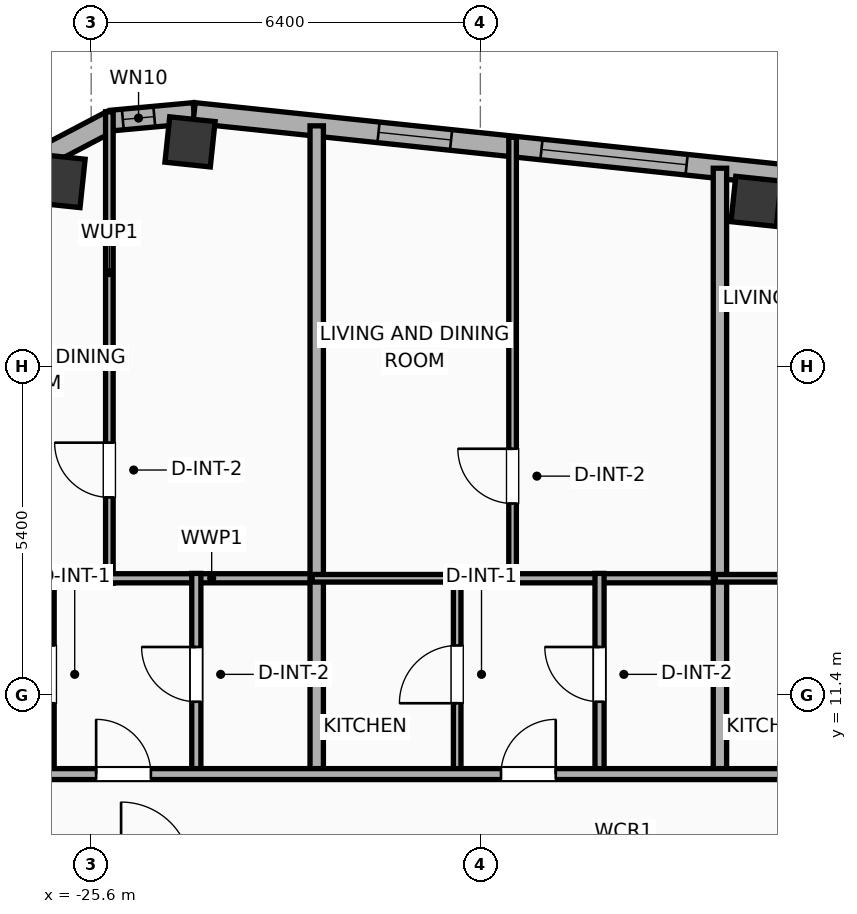
"""IFC4 building model, lengths in metres.
Left out: names, types, materials, properties, quantities, classifications, styles, units other than length and angle.
Written with IfcOpenShell. Run it as: python <this file> out.ifc"""

import sys

from ifc_helpers import new_model, si_unit, direction, frame, frame_2d, origin, origin_2d, place, context, subcontext, project, spatial, rectangle, hollow_rectangle, hollow_circle, extrude, element, fill, save


model = new_model("IFC4")
c1 = context("Model", 3, precision=1e-05, world=origin(), true_north=direction((0.0, 1.0)))
c2 = subcontext(c1, "Body", "Model", "MODEL_VIEW")
j1 = project(units=[si_unit("LENGTHUNIT", "METRE"), si_unit("PLANEANGLEUNIT", "RADIAN")], contexts=[c1])
p1 = place(None, origin())
s1 = spatial("IfcSite", under=j1, at=p1, CompositionType="ELEMENT")
p2 = place(p1, origin())
s2 = spatial("IfcBuilding", under=s1, at=p2, CompositionType="ELEMENT")
p3 = place(p2, frame((0.0, 0.0, 271.7)))
s3 = spatial("IfcBuildingStorey", under=s2, at=p3, CompositionType="ELEMENT", Elevation=271.7)
for number, where, z_axis, x_axis in (
    (1, (-14.666, 19.518, 0.0), (0.0, 0.0, 1.0), (0.995, -0.105, 0.0)),
    (2, (-23.975, 20.497, 0.0), (0.0, 0.0, 1.0), (0.995, -0.105, 0.0)),
):
    element("IfcColumn", number, at=place(p3, frame(where, z_axis=z_axis, x_axis=x_axis)), inside=s3, PredefinedType="COLUMN", context=c2, shape_type="SweptSolid", body=[
        extrude(hollow_rectangle(XDim=0.75, YDim=0.75, WallThickness=0.025, at=origin_2d()), origin(), (0.0, 0.0, 1.0), 3.9),
    ])
p4 = place(p3, frame((-26.139, 19.855, 0.0), z_axis=(0.0, 0.0, 1.0), x_axis=(0.994521895368, -0.104528463268, 0.0)))
e3 = element("IfcColumn", 3, at=p4, inside=s3, PredefinedType="COLUMN", context=c2, shape_type="SweptSolid", body=[
    extrude(hollow_circle(Radius=0.4, WallThickness=0.028, at=origin_2d()), origin(), (0.0, 0.0, 1.0), 3.9),
])
p5 = place(p3, frame((-26.439, 20.226, 0.0), z_axis=(0.0, 0.0, 1.0), x_axis=(0.884922182678, 0.465738908193, 0.0)))
e4 = element("IfcWall", 4, at=p5, inside=s3, PredefinedType="ELEMENTEDWALL", context=c2, shape_type="SweptSolid", body=[
    extrude(rectangle(XDim=1.337, YDim=0.34, at=frame_2d((0.668, 0.0))), origin(), (0.0, 0.0, 1.0), 3.65),
])
p6 = place(p3, frame((-25.256, 20.848, 0.0), z_axis=(0.0, 0.0, 1.0), x_axis=(0.995813013343, 0.091413579172, 0.0)))
e5 = element("IfcWall", 5, at=p6, inside=s3, PredefinedType="ELEMENTEDWALL", context=c2, shape_type="SweptSolid", body=[
    extrude(rectangle(XDim=1.354, YDim=0.34, at=frame_2d((0.677, 0.0))), origin(), (0.0, 0.0, 1.0), 3.65),
])
p7 = place(p6, frame((0.177, 0.0, 0.75)))
e6 = element("IfcOpeningElement", 6, at=p7, cuts=e5, PredefinedType="OPENING", context=c2, shape_type="SweptSolid", body=[
    extrude(rectangle(XDim=0.52, YDim=2.05, at=frame_2d((0.26, 1.025))), frame((0.0, 0.18, 0.0), z_axis=(0.0, -1.0, 0.0), x_axis=(1.0, 0.0, 0.0)), (0.0, 0.0, 1.0), 0.36),
])
p8 = place(p3, frame((-23.908, 20.972, 0.0), z_axis=(0.0, 0.0, 1.0), x_axis=(0.994521888554, -0.104528528102, 0.0)))
e7 = element("IfcWall", 7, at=p8, inside=s3, PredefinedType="ELEMENTEDWALL", context=c2, shape_type="SweptSolid", body=[
    extrude(rectangle(XDim=46.766, YDim=0.34, at=frame_2d((23.383, 0.0))), origin(), (0.0, 0.0, 1.0), 3.65),
])
p9 = place(p8, frame((5.744, 0.0, 0.75)))
e8 = element("IfcOpeningElement", 8, at=p9, cuts=e7, PredefinedType="OPENING", context=c2, shape_type="SweptSolid", body=[
    extrude(rectangle(XDim=2.4, YDim=2.1, at=frame_2d((1.2, 1.05))), frame((0.0, 0.18, 0.0), z_axis=(0.0, -1.0, 0.0), x_axis=(1.0, 0.0, 0.0)), (0.0, 0.0, 1.0), 0.36),
])
p10 = place(p8, frame((3.05, 0.0, 0.75)))
e9 = element("IfcOpeningElement", 9, at=p10, cuts=e7, PredefinedType="OPENING", context=c2, shape_type="SweptSolid", body=[
    extrude(rectangle(XDim=1.2, YDim=2.05, at=frame_2d((0.6, 1.025))), frame((0.0, 0.18, 0.0), z_axis=(0.0, -1.0, 0.0), x_axis=(1.0, 0.0, 0.0)), (0.0, 0.0, 1.0), 0.36),
])
p11 = place(p8, frame((9.957, 0.0, 0.75)))
e10 = element("IfcOpeningElement", 10, at=p11, cuts=e7, PredefinedType="OPENING", context=c2, shape_type="SweptSolid", body=[
    extrude(rectangle(XDim=1.2, YDim=2.05, at=frame_2d((0.6, 1.025))), frame((0.0, 0.18, 0.0), z_axis=(0.0, -1.0, 0.0), x_axis=(1.0, 0.0, 0.0)), (0.0, 0.0, 1.0), 0.36),
])
p12 = place(p8, frame((13.05, 0.0, 0.75)))
e11 = element("IfcOpeningElement", 11, at=p12, cuts=e7, PredefinedType="OPENING", context=c2, shape_type="SweptSolid", body=[
    extrude(rectangle(XDim=1.2, YDim=2.05, at=frame_2d((0.6, 1.025))), frame((0.0, 0.18, 0.0), z_axis=(0.0, -1.0, 0.0), x_axis=(1.0, 0.0, 0.0)), (0.0, 0.0, 1.0), 0.36),
])
p13 = place(p8, frame((16.383, 0.0, 0.75)))
e12 = element("IfcOpeningElement", 12, at=p13, cuts=e7, PredefinedType="OPENING", context=c2, shape_type="SweptSolid", body=[
    extrude(rectangle(XDim=1.2, YDim=2.05, at=frame_2d((0.6, 1.025))), frame((0.0, 0.18, 0.0), z_axis=(0.0, -1.0, 0.0), x_axis=(1.0, 0.0, 0.0)), (0.0, 0.0, 1.0), 0.36),
])
p14 = place(p8, frame((19.716, 0.0, 0.75)))
e13 = element("IfcOpeningElement", 13, at=p14, cuts=e7, PredefinedType="OPENING", context=c2, shape_type="SweptSolid", body=[
    extrude(rectangle(XDim=1.2, YDim=2.05, at=frame_2d((0.6, 1.025))), frame((0.0, 0.18, 0.0), z_axis=(0.0, -1.0, 0.0), x_axis=(1.0, 0.0, 0.0)), (0.0, 0.0, 1.0), 0.36),
])
p15 = place(p8, frame((23.195, 0.0, 0.75)))
e14 = element("IfcOpeningElement", 14, at=p15, cuts=e7, PredefinedType="OPENING", context=c2, shape_type="SweptSolid", body=[
    extrude(rectangle(XDim=1.2, YDim=2.05, at=frame_2d((0.6, 1.025))), frame((0.0, 0.18, 0.0), z_axis=(0.0, -1.0, 0.0), x_axis=(1.0, 0.0, 0.0)), (0.0, 0.0, 1.0), 0.36),
])
p16 = place(p8, frame((26.194, 0.0, 0.75)))
e15 = element("IfcOpeningElement", 15, at=p16, cuts=e7, PredefinedType="OPENING", context=c2, shape_type="SweptSolid", body=[
    extrude(rectangle(XDim=1.2, YDim=2.05, at=frame_2d((0.6, 1.025))), frame((0.0, 0.18, 0.0), z_axis=(0.0, -1.0, 0.0), x_axis=(1.0, 0.0, 0.0)), (0.0, 0.0, 1.0), 0.36),
])
p17 = place(p8, frame((30.152, 0.0, 0.75)))
e16 = element("IfcOpeningElement", 16, at=p17, cuts=e7, PredefinedType="OPENING", context=c2, shape_type="SweptSolid", body=[
    extrude(rectangle(XDim=1.2, YDim=2.05, at=frame_2d((0.6, 1.025))), frame((0.0, 0.18, 0.0), z_axis=(0.0, -1.0, 0.0), x_axis=(1.0, 0.0, 0.0)), (0.0, 0.0, 1.0), 0.36),
])
p18 = place(p8, frame((33.631, 0.0, 0.75)))
e17 = element("IfcOpeningElement", 17, at=p18, cuts=e7, PredefinedType="OPENING", context=c2, shape_type="SweptSolid", body=[
    extrude(rectangle(XDim=1.2, YDim=2.05, at=frame_2d((0.6, 1.025))), frame((0.0, 0.18, 0.0), z_axis=(0.0, -1.0, 0.0), x_axis=(1.0, 0.0, 0.0)), (0.0, 0.0, 1.0), 0.36),
])
p19 = place(p8, frame((38.07, 0.0, 0.75)))
e18 = element("IfcOpeningElement", 18, at=p19, cuts=e7, PredefinedType="OPENING", context=c2, shape_type="SweptSolid", body=[
    extrude(rectangle(XDim=1.2, YDim=2.05, at=frame_2d((0.6, 1.025))), frame((0.0, 0.18, 0.0), z_axis=(0.0, -1.0, 0.0), x_axis=(1.0, 0.0, 0.0)), (0.0, 0.0, 1.0), 0.36),
])
p20 = place(p8, frame((40.589, 0.0, 0.75)))
e19 = element("IfcOpeningElement", 19, at=p20, cuts=e7, PredefinedType="OPENING", context=c2, shape_type="SweptSolid", body=[
    extrude(rectangle(XDim=1.2, YDim=2.05, at=frame_2d((0.6, 1.025))), frame((0.0, 0.18, 0.0), z_axis=(0.0, -1.0, 0.0), x_axis=(1.0, 0.0, 0.0)), (0.0, 0.0, 1.0), 0.36),
])
p21 = place(p8, frame((43.789, 0.0, 0.75)))
e20 = element("IfcOpeningElement", 20, at=p21, cuts=e7, PredefinedType="OPENING", context=c2, shape_type="SweptSolid", body=[
    extrude(rectangle(XDim=1.2, YDim=2.05, at=frame_2d((0.6, 1.025))), frame((0.0, 0.18, 0.0), z_axis=(0.0, -1.0, 0.0), x_axis=(1.0, 0.0, 0.0)), (0.0, 0.0, 1.0), 0.36),
])
p22 = place(p3, frame((-25.301, 13.24, 0.0), z_axis=(0.0, 0.0, 1.0), x_axis=(0.0, 1.0, 0.0)))
e21 = element("IfcWall", 21, at=p22, inside=s3, PredefinedType="PARTITIONING", context=c2, shape_type="SweptSolid", body=[
    extrude(rectangle(XDim=7.751, YDim=0.125, at=frame_2d((3.875, 0.0))), origin(), (0.0, 0.0, 1.0), 3.65),
])
p23 = place(p22, frame((1.41, 0.0, 0.0)))
e22 = element("IfcOpeningElement", 22, at=p23, cuts=e21, PredefinedType="OPENING", context=c2, shape_type="SweptSolid", body=[
    extrude(rectangle(XDim=0.9, YDim=2.05, at=frame_2d((0.45, 1.025))), frame((0.0, 0.073, 0.0), z_axis=(0.0, -1.0, 0.0), x_axis=(1.0, 0.0, 0.0)), (0.0, 0.0, 1.0), 0.145),
])
p24 = place(p3, frame((-25.421, 13.32, 0.0), z_axis=(0.0, 0.0, 1.0), x_axis=(1.0, 0.0, 0.0)))
e23 = element("IfcWall", 23, at=p24, inside=s3, PredefinedType="PLUMBINGWALL", context=c2, shape_type="SweptSolid", body=[
    extrude(rectangle(XDim=3.605, YDim=0.15, at=frame_2d((1.802, 0.0))), origin(), (0.0, 0.0, 1.0), 3.65),
])
p25 = place(p3, frame((-26.271, 10.08, 0.0), z_axis=(0.0, 0.0, 1.0), x_axis=(0.0, 1.0, 0.0)))
e24 = element("IfcWall", 24, at=p25, inside=s3, PredefinedType="PARTITIONING", context=c2, shape_type="SweptSolid", body=[
    extrude(rectangle(XDim=3.32, YDim=0.125, at=frame_2d((1.66, 0.0))), origin(), (0.0, 0.0, 1.0), 3.65),
])
p26 = place(p25, frame((1.185, 0.0, 0.0)))
e25 = element("IfcOpeningElement", 25, at=p26, cuts=e24, PredefinedType="OPENING", context=c2, shape_type="SweptSolid", body=[
    extrude(rectangle(XDim=0.95, YDim=2.05, at=frame_2d((0.475, 1.025))), frame((0.0, 0.073, 0.0), z_axis=(0.0, -1.0, 0.0), x_axis=(1.0, 0.0, 0.0)), (0.0, 0.0, 1.0), 0.145),
])
p27 = place(p3, frame((-28.329, 13.32, 0.0), z_axis=(0.0, 0.0, 1.0), x_axis=(1.0, 0.0, 0.0)))
e26 = element("IfcWall", 26, at=p27, inside=s3, PredefinedType="PARTITIONING", context=c2, shape_type="SweptSolid", body=[
    extrude(rectangle(XDim=2.178, YDim=0.125, at=frame_2d((1.089, 0.0))), origin(), (0.0, 0.0, 1.0), 3.65),
])
p28 = place(p3, frame((-23.871, 10.08, 0.0), z_axis=(0.0, 0.0, 1.0), x_axis=(0.0, 1.0, 0.0)))
e27 = element("IfcWall", 27, at=p28, inside=s3, PredefinedType="PLUMBINGWALL", context=c2, shape_type="SweptSolid", body=[
    extrude(rectangle(XDim=3.32, YDim=0.15, at=frame_2d((1.66, 0.0))), origin(), (0.0, 0.0, 1.0), 3.65),
])
p29 = place(p28, frame((1.21, 0.0, 0.0)))
e28 = element("IfcOpeningElement", 28, at=p29, cuts=e27, PredefinedType="OPENING", context=c2, shape_type="SweptSolid", body=[
    extrude(rectangle(XDim=0.9, YDim=2.05, at=frame_2d((0.45, 1.025))), frame((0.0, 0.085, 0.0), z_axis=(0.0, -1.0, 0.0), x_axis=(1.0, 0.0, 0.0)), (0.0, 0.0, 1.0), 0.17),
])
p30 = place(p3, frame((-21.891, 10.02, 0.0), z_axis=(0.0, 0.0, 1.0), x_axis=(0.0, 1.0, 0.0)))
e29 = element("IfcWall", 29, at=p30, inside=s3, PredefinedType="PARTITIONING", context=c2, shape_type="SweptSolid", body=[
    extrude(rectangle(XDim=10.74, YDim=0.22, at=frame_2d((5.37, 0.0))), origin(), (0.0, 0.0, 1.0), 3.09),
])
p31 = place(p3, frame((-18.67, 13.24, 0.0), z_axis=(0.0, 0.0, 1.0), x_axis=(0.0, 1.0, 0.0)))
e30 = element("IfcWall", 30, at=p31, inside=s3, PredefinedType="PARTITIONING", context=c2, shape_type="SweptSolid", body=[
    extrude(rectangle(XDim=7.333, YDim=0.125, at=frame_2d((3.666, 0.0))), origin(), (0.0, 0.0, 1.0), 3.65),
])
p32 = place(p31, frame((1.31, 0.0, 0.0)))
e31 = element("IfcOpeningElement", 31, at=p32, cuts=e30, PredefinedType="OPENING", context=c2, shape_type="SweptSolid", body=[
    extrude(rectangle(XDim=0.9, YDim=2.05, at=frame_2d((0.45, 1.025))), frame((0.0, 0.073, 0.0), z_axis=(0.0, -1.0, 0.0), x_axis=(1.0, 0.0, 0.0)), (0.0, 0.0, 1.0), 0.145),
])
p33 = place(p3, frame((-18.79, 13.32, 0.0), z_axis=(0.0, 0.0, 1.0), x_axis=(1.0, 0.0, 0.0)))
e32 = element("IfcWall", 32, at=p33, inside=s3, PredefinedType="PLUMBINGWALL", context=c2, shape_type="SweptSolid", body=[
    extrude(rectangle(XDim=3.605, YDim=0.15, at=frame_2d((1.802, 0.0))), origin(), (0.0, 0.0, 1.0), 3.65),
])
p34 = place(p3, frame((-19.581, 10.08, 0.0), z_axis=(0.0, 0.0, 1.0), x_axis=(0.0, 1.0, 0.0)))
e33 = element("IfcWall", 33, at=p34, inside=s3, PredefinedType="PARTITIONING", context=c2, shape_type="SweptSolid", body=[
    extrude(rectangle(XDim=3.32, YDim=0.125, at=frame_2d((1.66, 0.0))), origin(), (0.0, 0.0, 1.0), 3.65),
])
p35 = place(p34, frame((1.185, 0.0, 0.0)))
e34 = element("IfcOpeningElement", 34, at=p35, cuts=e33, PredefinedType="OPENING", context=c2, shape_type="SweptSolid", body=[
    extrude(rectangle(XDim=0.95, YDim=2.05, at=frame_2d((0.475, 1.025))), frame((0.0, 0.073, 0.0), z_axis=(0.0, -1.0, 0.0), x_axis=(1.0, 0.0, 0.0)), (0.0, 0.0, 1.0), 0.145),
])
p36 = place(p3, frame((-21.966, 13.32, 0.0), z_axis=(0.0, 0.0, 1.0), x_axis=(1.0, 0.0, 0.0)))
e35 = element("IfcWall", 35, at=p36, inside=s3, PredefinedType="PARTITIONING", context=c2, shape_type="SweptSolid", body=[
    extrude(rectangle(XDim=2.505, YDim=0.125, at=frame_2d((1.252, 0.0))), origin(), (0.0, 0.0, 1.0), 3.65),
])
p37 = place(p3, frame((-17.24, 10.08, 0.0), z_axis=(0.0, 0.0, 1.0), x_axis=(0.0, 1.0, 0.0)))
e36 = element("IfcWall", 36, at=p37, inside=s3, PredefinedType="PLUMBINGWALL", context=c2, shape_type="SweptSolid", body=[
    extrude(rectangle(XDim=3.32, YDim=0.15, at=frame_2d((1.66, 0.0))), origin(), (0.0, 0.0, 1.0), 3.65),
])
p38 = place(p37, frame((1.21, 0.0, 0.0)))
e37 = element("IfcOpeningElement", 37, at=p38, cuts=e36, PredefinedType="OPENING", context=c2, shape_type="SweptSolid", body=[
    extrude(rectangle(XDim=0.9, YDim=2.05, at=frame_2d((0.45, 1.025))), frame((0.0, 0.085, 0.0), z_axis=(0.0, -1.0, 0.0), x_axis=(1.0, 0.0, 0.0)), (0.0, 0.0, 1.0), 0.17),
])
p39 = place(p3, frame((-15.26, 10.02, 0.0), z_axis=(0.0, 0.0, 1.0), x_axis=(0.0, 1.0, 0.0)))
e38 = element("IfcWall", 38, at=p39, inside=s3, PredefinedType="PARTITIONING", context=c2, shape_type="SweptSolid", body=[
    extrude(rectangle(XDim=10.043, YDim=0.22, at=frame_2d((5.021, 0.0))), origin(), (0.0, 0.0, 1.0), 3.09),
])
p40 = place(p3, frame((-15.335, 13.32, 0.0), z_axis=(0.0, 0.0, 1.0), x_axis=(1.0, 0.0, 0.0)))
e39 = element("IfcWall", 39, at=p40, inside=s3, PredefinedType="PARTITIONING", context=c2, shape_type="SweptSolid", body=[
    extrude(rectangle(XDim=2.505, YDim=0.125, at=frame_2d((1.252, 0.0))), origin(), (0.0, 0.0, 1.0), 3.65),
])
p41 = place(p3, frame((-28.516, 10.1, 0.0), z_axis=(0.0, 0.0, 1.0), x_axis=(1.0, 0.0, 0.0)))
e40 = element("IfcWall", 40, at=p41, inside=s3, PredefinedType="PARTITIONING", context=c2, shape_type="SweptSolid", body=[
    extrude(rectangle(XDim=53.955, YDim=0.18, at=frame_2d((26.978, 0.0))), origin(), (0.0, 0.0, 1.0), 3.65),
])
p42 = place(p41, frame((2.998, 0.0, 0.0)))
e41 = element("IfcOpeningElement", 41, at=p42, cuts=e40, PredefinedType="OPENING", context=c2, shape_type="SweptSolid", body=[
    extrude(rectangle(XDim=0.9, YDim=2.05, at=frame_2d((0.45, 1.025))), frame((0.0, 0.1, 0.0), z_axis=(0.0, -1.0, 0.0), x_axis=(1.0, 0.0, 0.0)), (0.0, 0.0, 1.0), 0.2),
])
p43 = place(p41, frame((9.656, 0.0, 0.0)))
e42 = element("IfcOpeningElement", 42, at=p43, cuts=e40, PredefinedType="OPENING", context=c2, shape_type="SweptSolid", body=[
    extrude(rectangle(XDim=0.9, YDim=2.05, at=frame_2d((0.45, 1.025))), frame((0.0, 0.1, 0.0), z_axis=(0.0, -1.0, 0.0), x_axis=(1.0, 0.0, 0.0)), (0.0, 0.0, 1.0), 0.2),
])
p44 = place(p41, frame((16.287, 0.0, 0.0)))
e43 = element("IfcOpeningElement", 43, at=p44, cuts=e40, PredefinedType="OPENING", context=c2, shape_type="SweptSolid", body=[
    extrude(rectangle(XDim=0.9, YDim=2.05, at=frame_2d((0.45, 1.025))), frame((0.0, 0.1, 0.0), z_axis=(0.0, -1.0, 0.0), x_axis=(1.0, 0.0, 0.0)), (0.0, 0.0, 1.0), 0.2),
])
p45 = place(p41, frame((22.918, 0.0, 0.0)))
e44 = element("IfcOpeningElement", 44, at=p45, cuts=e40, PredefinedType="OPENING", context=c2, shape_type="SweptSolid", body=[
    extrude(rectangle(XDim=0.9, YDim=2.05, at=frame_2d((0.45, 1.025))), frame((0.0, 0.1, 0.0), z_axis=(0.0, -1.0, 0.0), x_axis=(1.0, 0.0, 0.0)), (0.0, 0.0, 1.0), 0.2),
])
p46 = place(p41, frame((29.689, 0.0, 0.0)))
e45 = element("IfcOpeningElement", 45, at=p46, cuts=e40, PredefinedType="OPENING", context=c2, shape_type="SweptSolid", body=[
    extrude(rectangle(XDim=0.9, YDim=2.05, at=frame_2d((0.45, 1.025))), frame((0.0, 0.1, 0.0), z_axis=(0.0, -1.0, 0.0), x_axis=(1.0, 0.0, 0.0)), (0.0, 0.0, 1.0), 0.2),
])
p47 = place(p41, frame((36.612, 0.0, 0.0)))
e46 = element("IfcOpeningElement", 46, at=p47, cuts=e40, PredefinedType="OPENING", context=c2, shape_type="SweptSolid", body=[
    extrude(rectangle(XDim=0.9, YDim=2.05, at=frame_2d((0.45, 1.025))), frame((0.0, 0.1, 0.0), z_axis=(0.0, -1.0, 0.0), x_axis=(1.0, 0.0, 0.0)), (0.0, 0.0, 1.0), 0.2),
])
p48 = place(p41, frame((43.529, 0.0, 0.0)))
e47 = element("IfcOpeningElement", 47, at=p48, cuts=e40, PredefinedType="OPENING", context=c2, shape_type="SweptSolid", body=[
    extrude(rectangle(XDim=0.9, YDim=2.05, at=frame_2d((0.45, 1.025))), frame((0.0, 0.1, 0.0), z_axis=(0.0, -1.0, 0.0), x_axis=(1.0, 0.0, 0.0)), (0.0, 0.0, 1.0), 0.2),
])
p49 = place(p41, frame((50.452, 0.0, 0.0)))
e48 = element("IfcOpeningElement", 48, at=p49, cuts=e40, PredefinedType="OPENING", context=c2, shape_type="SweptSolid", body=[
    extrude(rectangle(XDim=0.9, YDim=2.05, at=frame_2d((0.45, 1.025))), frame((0.0, 0.1, 0.0), z_axis=(0.0, -1.0, 0.0), x_axis=(1.0, 0.0, 0.0)), (0.0, 0.0, 1.0), 0.2),
])
p50 = place(p9, origin())
e49 = element("IfcWindow", 49, at=p50, inside=s3, PartitioningType="SINGLE_PANEL", PredefinedType="WINDOW", context=c2, shape_type="SweptSolid", body=[
    extrude(rectangle(XDim=2.4, YDim=2.1, at=frame_2d((1.2, 1.05))), frame((0.0, 0.03, 0.0), z_axis=(0.0, -1.0, 0.0), x_axis=(1.0, 0.0, 0.0)), (0.0, 0.0, 1.0), 0.06),
])
fill(e8, e49)
p51 = place(p7, origin())
e50 = element("IfcWindow", 50, at=p51, inside=s3, PartitioningType="SINGLE_PANEL", PredefinedType="WINDOW", context=c2, shape_type="SweptSolid", body=[
    extrude(rectangle(XDim=0.52, YDim=2.05, at=frame_2d((0.26, 1.025))), frame((0.0, 0.03, 0.0), z_axis=(0.0, -1.0, 0.0), x_axis=(1.0, 0.0, 0.0)), (0.0, 0.0, 1.0), 0.06),
])
fill(e6, e50)
p52 = place(p10, origin())
e51 = element("IfcWindow", 51, at=p52, inside=s3, PartitioningType="SINGLE_PANEL", PredefinedType="WINDOW", context=c2, shape_type="SweptSolid", body=[
    extrude(rectangle(XDim=1.2, YDim=2.05, at=frame_2d((0.6, 1.025))), frame((0.0, 0.03, 0.0), z_axis=(0.0, -1.0, 0.0), x_axis=(1.0, 0.0, 0.0)), (0.0, 0.0, 1.0), 0.06),
])
fill(e9, e51)
p53 = place(p23, origin())
e52 = element("IfcDoor", 52, at=p53, inside=s3, OperationType="SINGLE_SWING_RIGHT", PredefinedType="DOOR", context=c2, shape_type="SweptSolid", body=[
    extrude(rectangle(XDim=0.9, YDim=2.05, at=frame_2d((0.45, 1.025))), frame((0.0, 0.025, 0.0), z_axis=(0.0, -1.0, 0.0), x_axis=(1.0, 0.0, 0.0)), (0.0, 0.0, 1.0), 0.05),
])
fill(e22, e52)
p54 = place(p29, origin())
e53 = element("IfcDoor", 53, at=p54, inside=s3, OperationType="SINGLE_SWING_RIGHT", PredefinedType="DOOR", context=c2, shape_type="SweptSolid", body=[
    extrude(rectangle(XDim=0.9, YDim=2.05, at=frame_2d((0.45, 1.025))), frame((0.0, 0.025, 0.0), z_axis=(0.0, -1.0, 0.0), x_axis=(1.0, 0.0, 0.0)), (0.0, 0.0, 1.0), 0.05),
])
fill(e28, e53)
p55 = place(p32, origin())
e54 = element("IfcDoor", 54, at=p55, inside=s3, OperationType="SINGLE_SWING_RIGHT", PredefinedType="DOOR", context=c2, shape_type="SweptSolid", body=[
    extrude(rectangle(XDim=0.9, YDim=2.05, at=frame_2d((0.45, 1.025))), frame((0.0, 0.025, 0.0), z_axis=(0.0, -1.0, 0.0), x_axis=(1.0, 0.0, 0.0)), (0.0, 0.0, 1.0), 0.05),
])
fill(e31, e54)
p56 = place(p35, origin())
e55 = element("IfcDoor", 55, at=p56, inside=s3, OperationType="SINGLE_SWING_LEFT", PredefinedType="DOOR", context=c2, shape_type="SweptSolid", body=[
    extrude(rectangle(XDim=0.95, YDim=2.05, at=frame_2d((0.475, 1.025))), frame((0.0, 0.025, 0.0), z_axis=(0.0, -1.0, 0.0), x_axis=(1.0, 0.0, 0.0)), (0.0, 0.0, 1.0), 0.05),
])
fill(e34, e55)
p57 = place(p38, origin())
e56 = element("IfcDoor", 56, at=p57, inside=s3, OperationType="SINGLE_SWING_RIGHT", PredefinedType="DOOR", context=c2, shape_type="SweptSolid", body=[
    extrude(rectangle(XDim=0.9, YDim=2.05, at=frame_2d((0.45, 1.025))), frame((0.0, 0.025, 0.0), z_axis=(0.0, -1.0, 0.0), x_axis=(1.0, 0.0, 0.0)), (0.0, 0.0, 1.0), 0.05),
])
fill(e37, e56)
p58 = place(p42, origin())
e57 = element("IfcDoor", 57, at=p58, inside=s3, OperationType="SINGLE_SWING_LEFT", PredefinedType="DOOR", context=c2, shape_type="SweptSolid", body=[
    extrude(rectangle(XDim=0.9, YDim=2.05, at=frame_2d((0.45, 1.025))), frame((0.0, 0.025, 0.0), z_axis=(0.0, -1.0, 0.0), x_axis=(1.0, 0.0, 0.0)), (0.0, 0.0, 1.0), 0.05),
])
fill(e41, e57)
p59 = place(p43, origin())
e58 = element("IfcDoor", 58, at=p59, inside=s3, OperationType="SINGLE_SWING_RIGHT", PredefinedType="DOOR", context=c2, shape_type="SweptSolid", body=[
    extrude(rectangle(XDim=0.9, YDim=2.05, at=frame_2d((0.45, 1.025))), frame((0.0, 0.025, 0.0), z_axis=(0.0, -1.0, 0.0), x_axis=(1.0, 0.0, 0.0)), (0.0, 0.0, 1.0), 0.05),
])
fill(e42, e58)
save(model, sys.argv[1])
